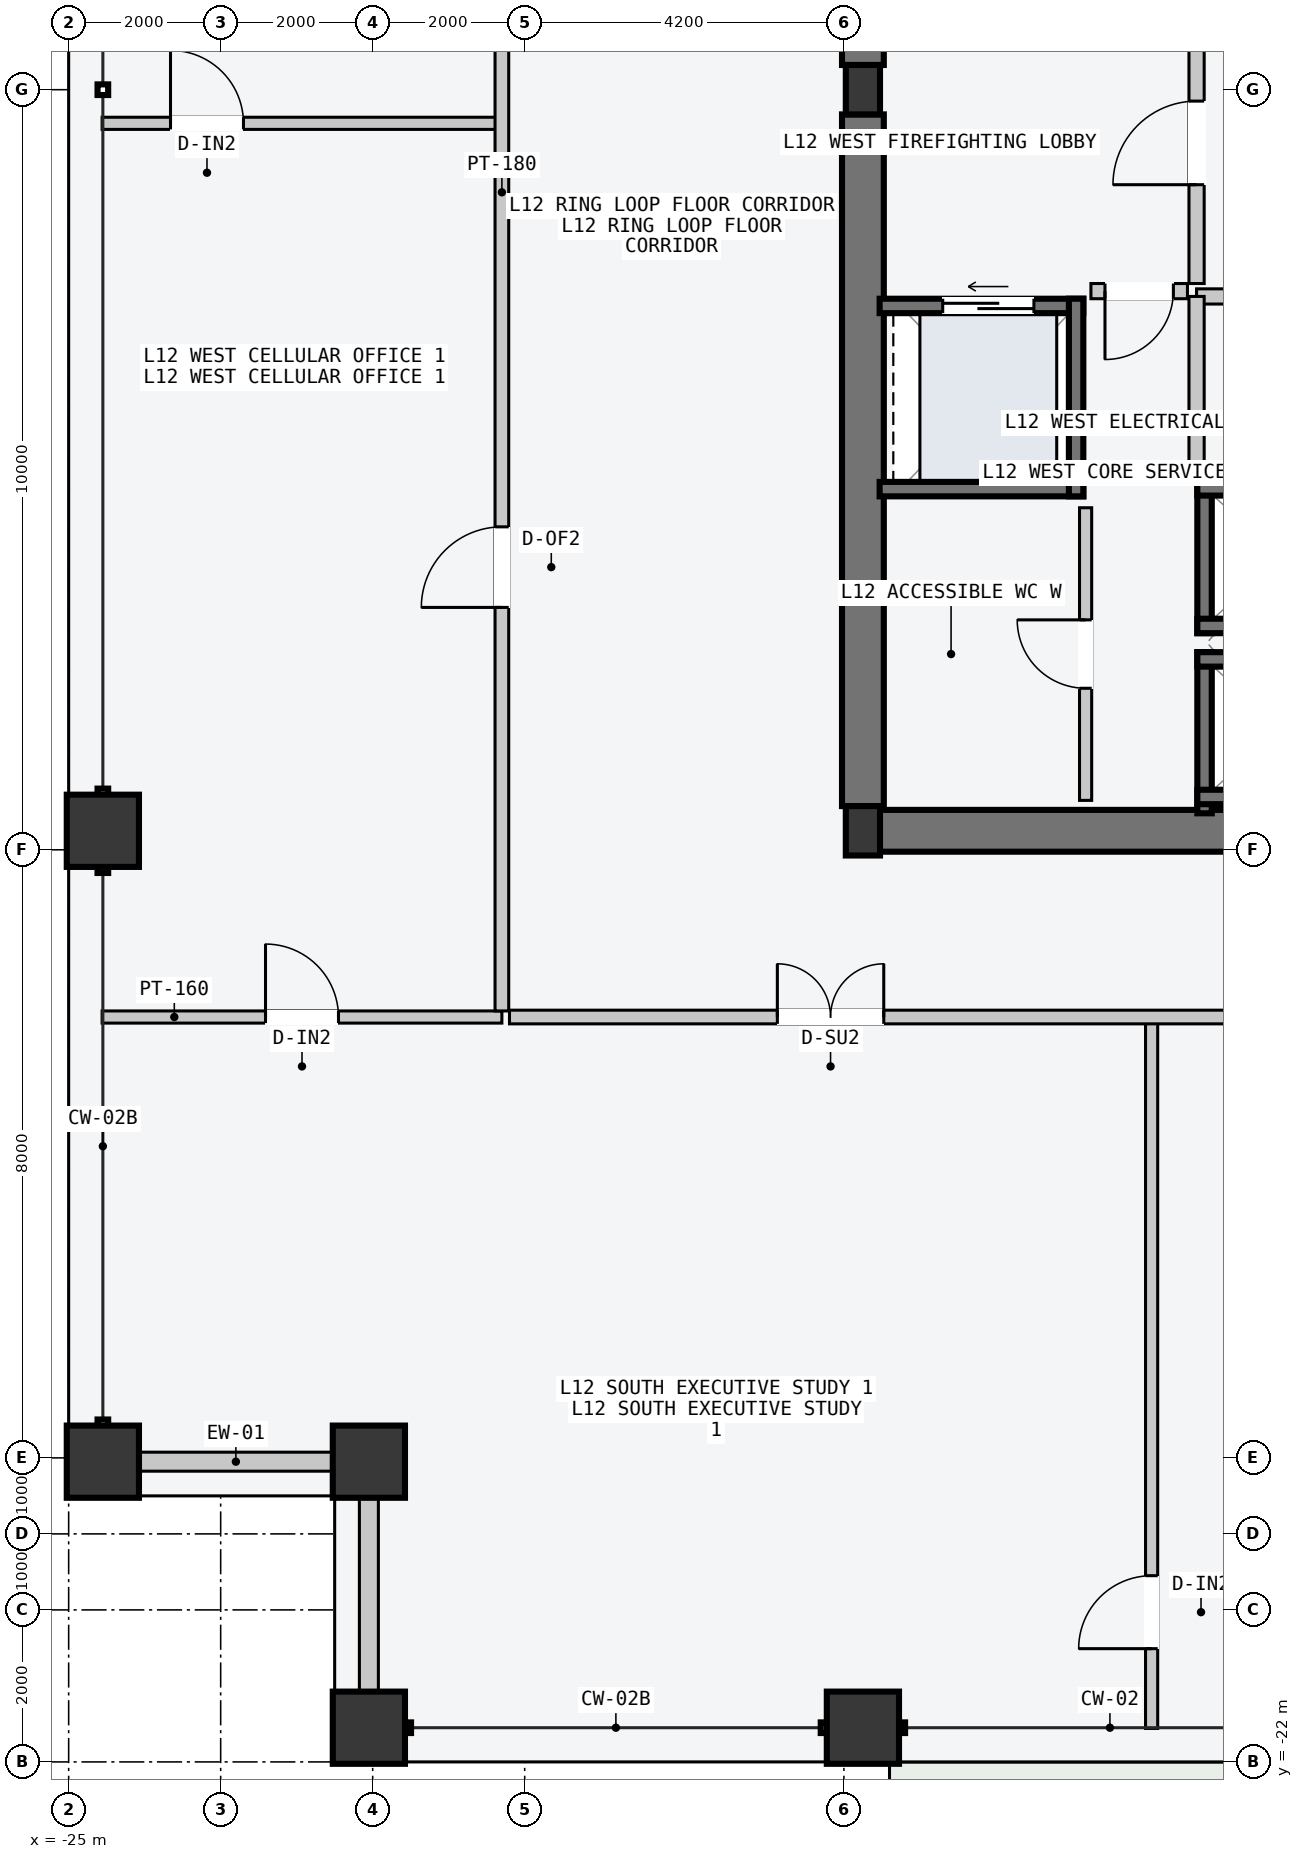
"""IFC4 building model, lengths in metres.
Left out: names, types, materials, properties, quantities, classifications, styles, units other than length and angle.
Written with IfcOpenShell. Run it as: python <this file> out.ifc"""

import sys

from ifc_helpers import new_model, si_unit, direction, frame, frame_2d, origin, origin_2d, place, context, subcontext, project, spatial, rectangle, hollow_rectangle, i_section, extrude, element, fill, save


model = new_model("IFC4")
c1 = context("Model", 3, precision=1e-05, world=origin(), true_north=direction((0.0, 1.0)))
c2 = subcontext(c1, "Body", "Model", "MODEL_VIEW")
j1 = project(units=[si_unit("LENGTHUNIT", "METRE"), si_unit("PLANEANGLEUNIT", "RADIAN")], contexts=[c1])
p1 = place(None, origin())
s1 = spatial("IfcSite", under=j1, at=p1, CompositionType="ELEMENT")
p2 = place(p1, origin())
s2 = spatial("IfcBuilding", under=s1, at=p2, CompositionType="ELEMENT")
p3 = place(p2, frame((0.0, 0.0, 49.2)))
s3 = spatial("IfcBuildingStorey", under=s2, at=p3, CompositionType="ELEMENT", Elevation=49.2)
p4 = place(p3, frame((-14.53, -9.75, -0.2), z_axis=(0.0, 0.0, 1.0), x_axis=(1.0, 0.0, 0.0)))
e1 = element("IfcWall", 1, at=p4, inside=s3, PredefinedType="SHEAR", context=c2, shape_type="SweptSolid", body=[
    extrude(rectangle(XDim=6.46, YDim=0.55, at=frame_2d((3.23, 0.0))), origin(), (0.0, 0.0, 1.0), 3.6),
])
for number, where, z_axis, x_axis in (
    (2, (-14.55, -9.425, -0.2), (0.0, 0.0, 1.0), (0.0, 1.0, 0.0)),
    (3, (-14.55, 0.325, -0.2), (0.0, 0.0, 1.0), (0.0, 1.0, 0.0)),
):
    element("IfcWall", number, at=place(p3, frame(where, z_axis=z_axis, x_axis=x_axis)), inside=s3, PredefinedType="SHEAR", context=c2, shape_type="SweptSolid", body=[
        extrude(rectangle(XDim=9.1, YDim=0.55, at=frame_2d((4.55, 0.0))), origin(), (0.0, 0.0, 1.0), 3.6),
    ])
for number, where, z_axis, x_axis in (
    (4, (-14.55, -9.75, 0.0), (0.0, 0.0, 1.0), (1.0, 0.0, 0.0)),
    (5, (-14.55, 0.0, 0.0), (0.0, 0.0, 1.0), (1.0, 0.0, 0.0)),
):
    element("IfcColumn", number, at=place(p3, frame(where, z_axis=z_axis, x_axis=x_axis)), inside=s3, PredefinedType="COLUMN", context=c2, shape_type="SweptSolid", body=[
        extrude(i_section(OverallWidth=0.45, OverallDepth=0.65, WebThickness=0.025, FlangeThickness=0.04, at=origin_2d()), origin(), (0.0, 0.0, 1.0), 3.6),
    ])
for number, where, z_axis, x_axis in (
    (6, (-21.05, -21.55, 0.0), (0.0, 0.0, 1.0), (1.0, 0.0, 0.0)),
    (7, (-14.55, -21.55, 0.0), (0.0, 0.0, 1.0), (1.0, 0.0, 0.0)),
    (8, (-24.55, -18.05, 0.0), (0.0, 0.0, 1.0), (0.0, 1.0, 0.0)),
    (9, (-24.55, -9.75, 0.0), (0.0, 0.0, 1.0), (0.0, 1.0, 0.0)),
    (10, (-21.05, -18.05, 0.0), (0.0, 0.0, 1.0), (1.0, 0.0, 0.0)),
):
    element("IfcColumn", number, at=place(p3, frame(where, z_axis=z_axis, x_axis=x_axis)), inside=s3, PredefinedType="COLUMN", context=c2, shape_type="SweptSolid", body=[
        extrude(hollow_rectangle(XDim=0.95, YDim=0.95, WallThickness=0.048, at=origin_2d()), origin(), (0.0, 0.0, 1.0), 3.6),
    ])
for number, where, z_axis, x_axis in (
    (11, (-24.065, -18.05, 0.0), (0.0, 0.0, 1.0), (1.0, 0.0, 0.0)),
    (12, (-21.05, -21.065, 0.0), (0.0, 0.0, 1.0), (0.0, 1.0, 0.0)),
):
    element("IfcWall", number, at=place(p3, frame(where, z_axis=z_axis, x_axis=x_axis)), inside=s3, PredefinedType="STANDARD", context=c2, shape_type="SweptSolid", body=[
        extrude(rectangle(XDim=2.53, YDim=0.25, at=frame_2d((1.265, 0.0))), origin(), (0.0, 0.0, 1.0), 2.7),
    ])
p5 = place(p3, frame((-10.055, -9.52, -0.2), z_axis=(0.0, 0.0, 1.0), x_axis=(0.0, 1.0, 0.0)))
e13 = element("IfcWall", 13, at=p5, inside=s3, PredefinedType="SOLIDWALL", context=c2, shape_type="SweptSolid", body=[
    extrude(rectangle(XDim=2.12, YDim=0.19, at=frame_2d((1.06, 0.0))), origin(), (0.0, 0.0, 1.0), 3.6),
])
for number, where, z_axis, x_axis in (
    (14, (-10.15, -7.495, -0.2), (0.0, 0.0, 1.0), (1.0, 0.0, 0.0)),
    (15, (-10.15, -9.305, -0.2), (0.0, 0.0, 1.0), (1.0, 0.0, 0.0)),
):
    element("IfcWall", number, at=place(p3, frame(where, z_axis=z_axis, x_axis=x_axis)), inside=s3, PredefinedType="SOLIDWALL", context=c2, shape_type="SweptSolid", body=[
        extrude(rectangle(XDim=2.2, YDim=0.19, at=frame_2d((1.1, 0.0))), origin(), (0.0, 0.0, 1.0), 3.6),
    ])
p6 = place(p3, frame((-10.055, -7.15, -0.2), z_axis=(0.0, 0.0, 1.0), x_axis=(0.0, 1.0, 0.0)))
e16 = element("IfcWall", 16, at=p6, inside=s3, PredefinedType="SOLIDWALL", context=c2, shape_type="SweptSolid", body=[
    extrude(rectangle(XDim=2.0, YDim=0.19, at=frame_2d((1.0, 0.0))), origin(), (0.0, 0.0, 1.0), 3.6),
])
for number, where, z_axis, x_axis in (
    (17, (-10.15, -5.245, -0.2), (0.0, 0.0, 1.0), (1.0, 0.0, 0.0)),
    (18, (-10.15, -7.055, -0.2), (0.0, 0.0, 1.0), (1.0, 0.0, 0.0)),
):
    element("IfcWall", number, at=place(p3, frame(where, z_axis=z_axis, x_axis=x_axis)), inside=s3, PredefinedType="SOLIDWALL", context=c2, shape_type="SweptSolid", body=[
        extrude(rectangle(XDim=2.2, YDim=0.19, at=frame_2d((1.1, 0.0))), origin(), (0.0, 0.0, 1.0), 3.6),
    ])
p7 = place(p3, frame((-14.33, -2.845, -0.2), z_axis=(0.0, 0.0, 1.0), x_axis=(1.0, 0.0, 0.0)))
e19 = element("IfcWall", 19, at=p7, inside=s3, PredefinedType="SOLIDWALL", context=c2, shape_type="SweptSolid", body=[
    extrude(rectangle(XDim=2.68, YDim=0.19, at=frame_2d((1.34, 0.0))), origin(), (0.0, 0.0, 1.0), 3.6),
])
p8 = place(p7, frame((0.83, 0.0, 0.2)))
e20 = element("IfcOpeningElement", 20, at=p8, cuts=e19, PredefinedType="OPENING", context=c2, shape_type="SweptSolid", body=[
    extrude(rectangle(XDim=1.2, YDim=2.2, at=frame_2d((0.6, 1.1))), frame((0.0, 0.105, 0.0), z_axis=(0.0, -1.0, 0.0), x_axis=(1.0, 0.0, 0.0)), (0.0, 0.0, 1.0), 0.21),
])
p9 = place(p3, frame((-14.33, -5.255, -0.2), z_axis=(0.0, 0.0, 1.0), x_axis=(1.0, 0.0, 0.0)))
e21 = element("IfcWall", 21, at=p9, inside=s3, PredefinedType="SOLIDWALL", context=c2, shape_type="SweptSolid", body=[
    extrude(rectangle(XDim=2.68, YDim=0.19, at=frame_2d((1.34, 0.0))), origin(), (0.0, 0.0, 1.0), 3.6),
])
p10 = place(p3, frame((-11.745, -5.35, -0.2), z_axis=(0.0, 0.0, 1.0), x_axis=(0.0, 1.0, 0.0)))
e22 = element("IfcWall", 22, at=p10, inside=s3, PredefinedType="SOLIDWALL", context=c2, shape_type="SweptSolid", body=[
    extrude(rectangle(XDim=2.6, YDim=0.19, at=frame_2d((1.3, 0.0))), origin(), (0.0, 0.0, 1.0), 3.6),
])
p11 = place(p3, frame((-10.16, -2.55, 0.0), z_axis=(0.0, 0.0, 1.0), x_axis=(0.0, 1.0, 0.0)))
e23 = element("IfcWall", 23, at=p11, inside=s3, PredefinedType="PARTITIONING", context=c2, shape_type="SweptSolid", body=[
    extrude(rectangle(XDim=3.4, YDim=0.2, at=frame_2d((1.7, 0.0))), origin(), (0.0, 0.0, 1.0), 3.4),
])
p12 = place(p11, frame((1.3, 0.0, 0.0)))
e24 = element("IfcOpeningElement", 24, at=p12, cuts=e23, PredefinedType="OPENING", context=c2, shape_type="SweptSolid", body=[
    extrude(rectangle(XDim=1.1, YDim=2.15, at=frame_2d((0.55, 1.075))), frame((0.0, 0.11, 0.0), z_axis=(0.0, -1.0, 0.0), x_axis=(1.0, 0.0, 0.0)), (0.0, 0.0, 1.0), 0.22),
])
p13 = place(p3, frame((-10.28, -2.65, 0.0), z_axis=(0.0, 0.0, 1.0), x_axis=(-1.0, 0.0, 0.0)))
e25 = element("IfcWall", 25, at=p13, inside=s3, PredefinedType="PARTITIONING", context=c2, shape_type="SweptSolid", body=[
    extrude(rectangle(XDim=1.27, YDim=0.2, at=frame_2d((0.635, 0.0))), origin(), (0.0, 0.0, 1.0), 3.4),
])
p14 = place(p13, frame((0.185, 0.0, 0.0)))
e26 = element("IfcOpeningElement", 26, at=p14, cuts=e25, PredefinedType="OPENING", context=c2, shape_type="SweptSolid", body=[
    extrude(rectangle(XDim=0.9, YDim=2.15, at=frame_2d((0.45, 1.075))), frame((0.0, 0.11, 0.0), z_axis=(0.0, -1.0, 0.0), x_axis=(1.0, 0.0, 0.0)), (0.0, 0.0, 1.0), 0.22),
])
p15 = place(p3, frame((-7.96, -2.72, 0.0), z_axis=(0.0, 0.0, 1.0), x_axis=(-1.0, 0.0, 0.0)))
e27 = element("IfcWall", 27, at=p15, inside=s3, PredefinedType="PARTITIONING", context=c2, shape_type="SweptSolid", body=[
    extrude(rectangle(XDim=2.2, YDim=0.2, at=frame_2d((1.1, 0.0))), origin(), (0.0, 0.0, 1.0), 3.4),
])
p16 = place(p15, frame((0.62, 0.0, 0.0)))
e28 = element("IfcOpeningElement", 28, at=p16, cuts=e27, PredefinedType="OPENING", context=c2, shape_type="SweptSolid", body=[
    extrude(rectangle(XDim=0.95, YDim=2.1, at=frame_2d((0.475, 1.05))), frame((0.0, 0.11, 0.0), z_axis=(0.0, -1.0, 0.0), x_axis=(1.0, 0.0, 0.0)), (0.0, 0.0, 1.0), 0.22),
])
p17 = place(p3, frame((-10.16, -5.16, 0.0), z_axis=(0.0, 0.0, 1.0), x_axis=(0.0, 1.0, 0.0)))
e29 = element("IfcWall", 29, at=p17, inside=s3, PredefinedType="PARTITIONING", context=c2, shape_type="SweptSolid", body=[
    extrude(rectangle(XDim=2.44, YDim=0.2, at=frame_2d((1.22, 0.0))), origin(), (0.0, 0.0, 1.0), 3.4),
])
p18 = place(p3, frame((-11.62, -9.35, 0.0), z_axis=(0.0, 0.0, 1.0), x_axis=(0.0, 1.0, 0.0)))
e30 = element("IfcWall", 30, at=p18, inside=s3, PredefinedType="PARTITIONING", context=c2, shape_type="SweptSolid", body=[
    extrude(rectangle(XDim=3.85, YDim=0.16, at=frame_2d((1.925, 0.0))), origin(), (0.0, 0.0, 1.0), 3.4),
])
p19 = place(p18, frame((1.475, 0.0, 0.0)))
e31 = element("IfcOpeningElement", 31, at=p19, cuts=e30, PredefinedType="OPENING", context=c2, shape_type="SweptSolid", body=[
    extrude(rectangle(XDim=0.9, YDim=2.15, at=frame_2d((0.45, 1.075))), frame((0.0, 0.09, 0.0), z_axis=(0.0, -1.0, 0.0), x_axis=(1.0, 0.0, 0.0)), (0.0, 0.0, 1.0), 0.18),
])
p20 = place(p3, frame((-10.751, -21.56, 0.0), z_axis=(0.0, 0.0, 1.0), x_axis=(0.0, 1.0, 0.0)))
e32 = element("IfcWall", 32, at=p20, inside=s3, PredefinedType="PARTITIONING", context=c2, shape_type="SweptSolid", body=[
    extrude(rectangle(XDim=9.3, YDim=0.16, at=frame_2d((4.65, 0.0))), origin(), (0.0, 0.0, 1.0), 3.4),
])
p21 = place(p20, frame((1.05, 0.0, 0.0)))
e33 = element("IfcOpeningElement", 33, at=p21, cuts=e32, PredefinedType="OPENING", context=c2, shape_type="SweptSolid", body=[
    extrude(rectangle(XDim=0.96, YDim=2.18, at=frame_2d((0.48, 1.09))), frame((0.0, 0.09, 0.0), z_axis=(0.0, -1.0, 0.0), x_axis=(1.0, 0.0, 0.0)), (0.0, 0.0, 1.0), 0.18),
])
p22 = place(p3, frame((-19.2, -12.2, 0.0), z_axis=(0.0, 0.0, 1.0), x_axis=(1.0, 0.0, 0.0)))
e34 = element("IfcWall", 34, at=p22, inside=s3, PredefinedType="PARTITIONING", context=c2, shape_type="SweptSolid", body=[
    extrude(rectangle(XDim=38.4, YDim=0.18, at=frame_2d((19.2, 0.0))), origin(), (0.0, 0.0, 1.0), 3.4),
])
p23 = place(p22, frame((3.524, 0.0, 0.0)))
e35 = element("IfcOpeningElement", 35, at=p23, cuts=e34, PredefinedType="OPENING", context=c2, shape_type="SweptSolid", body=[
    extrude(rectangle(XDim=1.4, YDim=2.2, at=frame_2d((0.7, 1.1))), frame((0.0, 0.1, 0.0), z_axis=(0.0, -1.0, 0.0), x_axis=(1.0, 0.0, 0.0)), (0.0, 0.0, 1.0), 0.2),
])
p24 = place(p22, frame((14.768, 0.0, 0.0)))
e36 = element("IfcOpeningElement", 36, at=p24, cuts=e34, PredefinedType="OPENING", context=c2, shape_type="SweptSolid", body=[
    extrude(rectangle(XDim=0.9, YDim=2.15, at=frame_2d((0.45, 1.075))), frame((0.0, 0.1, 0.0), z_axis=(0.0, -1.0, 0.0), x_axis=(1.0, 0.0, 0.0)), (0.0, 0.0, 1.0), 0.2),
])
p25 = place(p22, frame((29.714, 0.0, 0.0)))
e37 = element("IfcOpeningElement", 37, at=p25, cuts=e34, PredefinedType="OPENING", context=c2, shape_type="SweptSolid", body=[
    extrude(rectangle(XDim=0.96, YDim=2.18, at=frame_2d((0.48, 1.09))), frame((0.0, 0.1, 0.0), z_axis=(0.0, -1.0, 0.0), x_axis=(1.0, 0.0, 0.0)), (0.0, 0.0, 1.0), 0.2),
])
p26 = place(p3, frame((-24.56, -12.2, 0.0), z_axis=(0.0, 0.0, 1.0), x_axis=(1.0, 0.0, 0.0)))
e38 = element("IfcWall", 38, at=p26, inside=s3, PredefinedType="PARTITIONING", context=c2, shape_type="SweptSolid", body=[
    extrude(rectangle(XDim=5.26, YDim=0.16, at=frame_2d((2.63, 0.0))), origin(), (0.0, 0.0, 1.0), 3.4),
])
p27 = place(p26, frame((2.15, 0.0, 0.0)))
e39 = element("IfcOpeningElement", 39, at=p27, cuts=e38, PredefinedType="OPENING", context=c2, shape_type="SweptSolid", body=[
    extrude(rectangle(XDim=0.96, YDim=2.18, at=frame_2d((0.48, 1.09))), frame((0.0, 0.09, 0.0), z_axis=(0.0, -1.0, 0.0), x_axis=(1.0, 0.0, 0.0)), (0.0, 0.0, 1.0), 0.18),
])
p28 = place(p3, frame((-24.56, -0.442, 0.0), z_axis=(0.0, 0.0, 1.0), x_axis=(1.0, 0.0, 0.0)))
e40 = element("IfcWall", 40, at=p28, inside=s3, PredefinedType="PARTITIONING", context=c2, shape_type="SweptSolid", body=[
    extrude(rectangle(XDim=5.2, YDim=0.16, at=frame_2d((2.6, 0.0))), origin(), (0.0, 0.0, 1.0), 3.4),
])
p29 = place(p28, frame((0.9, 0.0, 0.0)))
e41 = element("IfcOpeningElement", 41, at=p29, cuts=e40, PredefinedType="OPENING", context=c2, shape_type="SweptSolid", body=[
    extrude(rectangle(XDim=0.96, YDim=2.18, at=frame_2d((0.48, 1.09))), frame((0.0, 0.09, 0.0), z_axis=(0.0, -1.0, 0.0), x_axis=(1.0, 0.0, 0.0)), (0.0, 0.0, 1.0), 0.18),
])
p30 = place(p3, frame((-19.3, -12.12, 0.0), z_axis=(0.0, 0.0, 1.0), x_axis=(0.0, 1.0, 0.0)))
e42 = element("IfcWall", 42, at=p30, inside=s3, PredefinedType="PARTITIONING", context=c2, shape_type="SweptSolid", body=[
    extrude(rectangle(XDim=26.54, YDim=0.18, at=frame_2d((13.27, 0.0))), origin(), (0.0, 0.0, 1.0), 3.4),
])
p31 = place(p30, frame((5.309, 0.0, 0.0)))
e43 = element("IfcOpeningElement", 43, at=p31, cuts=e42, PredefinedType="OPENING", context=c2, shape_type="SweptSolid", body=[
    extrude(rectangle(XDim=1.06, YDim=2.2, at=frame_2d((0.53, 1.1))), frame((0.0, 0.1, 0.0), z_axis=(0.0, -1.0, 0.0), x_axis=(1.0, 0.0, 0.0)), (0.0, 0.0, 1.0), 0.2),
])
p32 = place(p30, frame((15.171, 0.0, 0.0)))
e44 = element("IfcOpeningElement", 44, at=p32, cuts=e42, PredefinedType="OPENING", context=c2, shape_type="SweptSolid", body=[
    extrude(rectangle(XDim=1.24, YDim=2.24, at=frame_2d((0.62, 1.12))), frame((0.0, 0.1, 0.0), z_axis=(0.0, -1.0, 0.0), x_axis=(1.0, 0.0, 0.0)), (0.0, 0.0, 1.0), 0.2),
])
p33 = place(p30, frame((22.522, 0.0, 0.0)))
e45 = element("IfcOpeningElement", 45, at=p33, cuts=e42, PredefinedType="OPENING", context=c2, shape_type="SweptSolid", body=[
    extrude(rectangle(XDim=1.4, YDim=2.2, at=frame_2d((0.7, 1.1))), frame((0.0, 0.1, 0.0), z_axis=(0.0, -1.0, 0.0), x_axis=(1.0, 0.0, 0.0)), (0.0, 0.0, 1.0), 0.2),
])
p34 = place(p8, origin())
e46 = element("IfcDoor", 46, at=p34, inside=s3, OperationType="SLIDING_TO_LEFT", PredefinedType="DOOR", context=c2, shape_type="SweptSolid", body=[
    extrude(rectangle(XDim=1.2, YDim=2.2, at=frame_2d((0.6, 1.1))), frame((0.0, 0.025, 0.0), z_axis=(0.0, -1.0, 0.0), x_axis=(1.0, 0.0, 0.0)), (0.0, 0.0, 1.0), 0.05),
])
fill(e20, e46)
p35 = place(p12, origin())
e47 = element("IfcDoor", 47, at=p35, inside=s3, OperationType="SINGLE_SWING_LEFT", PredefinedType="DOOR", context=c2, shape_type="SweptSolid", body=[
    extrude(rectangle(XDim=1.1, YDim=2.15, at=frame_2d((0.55, 1.075))), frame((0.0, 0.025, 0.0), z_axis=(0.0, -1.0, 0.0), x_axis=(1.0, 0.0, 0.0)), (0.0, 0.0, 1.0), 0.05),
])
fill(e24, e47)
p36 = place(p14, origin())
e48 = element("IfcDoor", 48, at=p36, inside=s3, OperationType="SINGLE_SWING_RIGHT", PredefinedType="DOOR", context=c2, shape_type="SweptSolid", body=[
    extrude(rectangle(XDim=0.9, YDim=2.15, at=frame_2d((0.45, 1.075))), frame((0.0, 0.025, 0.0), z_axis=(0.0, -1.0, 0.0), x_axis=(1.0, 0.0, 0.0)), (0.0, 0.0, 1.0), 0.05),
])
fill(e26, e48)
p37 = place(p19, origin())
e49 = element("IfcDoor", 49, at=p37, inside=s3, OperationType="SINGLE_SWING_RIGHT", PredefinedType="DOOR", context=c2, shape_type="SweptSolid", body=[
    extrude(rectangle(XDim=0.9, YDim=2.15, at=frame_2d((0.45, 1.075))), frame((0.0, 0.025, 0.0), z_axis=(0.0, -1.0, 0.0), x_axis=(1.0, 0.0, 0.0)), (0.0, 0.0, 1.0), 0.05),
])
fill(e31, e49)
p38 = place(p21, origin())
e50 = element("IfcDoor", 50, at=p38, inside=s3, OperationType="SINGLE_SWING_LEFT", PredefinedType="DOOR", context=c2, shape_type="SweptSolid", body=[
    extrude(rectangle(XDim=0.96, YDim=2.18, at=frame_2d((0.48, 1.09))), frame((0.0, 0.025, 0.0), z_axis=(0.0, -1.0, 0.0), x_axis=(1.0, 0.0, 0.0)), (0.0, 0.0, 1.0), 0.05),
])
fill(e33, e50)
p39 = place(p23, origin())
e51 = element("IfcDoor", 51, at=p39, inside=s3, OperationType="DOUBLE_DOOR_SINGLE_SWING", PredefinedType="DOOR", context=c2, shape_type="SweptSolid", body=[
    extrude(rectangle(XDim=1.4, YDim=2.2, at=frame_2d((0.7, 1.1))), frame((0.0, 0.025, 0.0), z_axis=(0.0, -1.0, 0.0), x_axis=(1.0, 0.0, 0.0)), (0.0, 0.0, 1.0), 0.05),
])
fill(e35, e51)
p40 = place(p27, origin())
e52 = element("IfcDoor", 52, at=p40, inside=s3, OperationType="SINGLE_SWING_LEFT", PredefinedType="DOOR", context=c2, shape_type="SweptSolid", body=[
    extrude(rectangle(XDim=0.96, YDim=2.18, at=frame_2d((0.48, 1.09))), frame((0.0, 0.025, 0.0), z_axis=(0.0, -1.0, 0.0), x_axis=(1.0, 0.0, 0.0)), (0.0, 0.0, 1.0), 0.05),
])
fill(e39, e52)
p41 = place(p29, origin())
e53 = element("IfcDoor", 53, at=p41, inside=s3, OperationType="SINGLE_SWING_LEFT", PredefinedType="DOOR", context=c2, shape_type="SweptSolid", body=[
    extrude(rectangle(XDim=0.96, YDim=2.18, at=frame_2d((0.48, 1.09))), frame((0.0, 0.025, 0.0), z_axis=(0.0, -1.0, 0.0), x_axis=(1.0, 0.0, 0.0)), (0.0, 0.0, 1.0), 0.05),
])
fill(e41, e53)
p42 = place(p31, origin())
e54 = element("IfcDoor", 54, at=p42, inside=s3, OperationType="SINGLE_SWING_LEFT", PredefinedType="DOOR", context=c2, shape_type="SweptSolid", body=[
    extrude(rectangle(XDim=1.06, YDim=2.2, at=frame_2d((0.53, 1.1))), frame((0.0, 0.025, 0.0), z_axis=(0.0, -1.0, 0.0), x_axis=(1.0, 0.0, 0.0)), (0.0, 0.0, 1.0), 0.05),
])
fill(e43, e54)
save(model, sys.argv[1])
